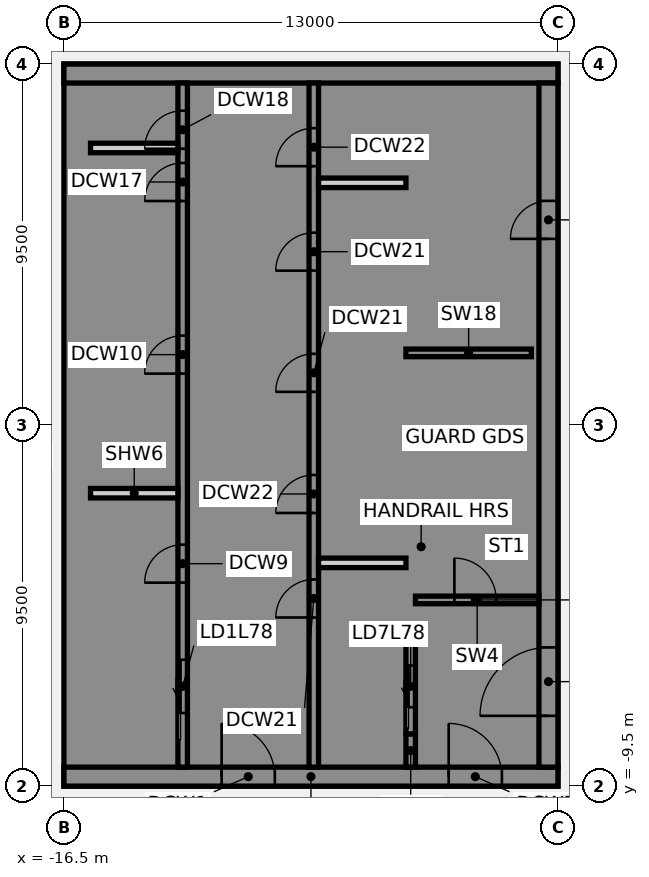
"""IFC4 building model, lengths in metres.
Left out: names, types, materials, properties, quantities, classifications, styles, units other than length and angle.
Written with IfcOpenShell. Run it as: python <this file> out.ifc"""

import sys

from ifc_helpers import new_model, si_unit, direction, frame, frame_2d, origin, place, context, subcontext, project, spatial, polyline, rectangle, outline, extrude, element, fill, save


model = new_model("IFC4")
c1 = context("Model", 3, precision=1e-05, world=origin(), true_north=direction((0.0, 1.0)))
c2 = subcontext(c1, "Body", "Model", "MODEL_VIEW")
j1 = project(units=[si_unit("LENGTHUNIT", "METRE"), si_unit("PLANEANGLEUNIT", "RADIAN")], contexts=[c1])
p1 = place(None, origin())
s1 = spatial("IfcSite", under=j1, at=p1, CompositionType="ELEMENT")
p2 = place(p1, origin())
s2 = spatial("IfcBuilding", under=s1, at=p2, CompositionType="ELEMENT")
p3 = place(p2, frame((0.0, 0.0, 317.4)))
s3 = spatial("IfcBuildingStorey", under=s2, at=p3, CompositionType="ELEMENT", Elevation=317.4)
p4 = place(p3, frame((-16.5, -9.25, 0.0), z_axis=(0.0, 0.0, 1.0), x_axis=(1.0, 0.0, 0.0)))
e1 = element("IfcWall", 1, at=p4, inside=s3, PredefinedType="SHEAR", context=c2, shape_type="SweptSolid", body=[
    extrude(rectangle(XDim=13.0, YDim=0.5, at=frame_2d((6.5, 0.0))), origin(), (0.0, 0.0, 1.0), 3.82),
])
p5 = place(p4, frame((4.15, 0.0, 0.0)))
e2 = element("IfcOpeningElement", 2, at=p5, cuts=e1, PredefinedType="OPENING", context=c2, shape_type="SweptSolid", body=[
    extrude(rectangle(XDim=1.4, YDim=2.1, at=frame_2d((0.7, 1.05))), frame((0.0, 0.26, 0.0), z_axis=(0.0, -1.0, 0.0), x_axis=(1.0, 0.0, 0.0)), (0.0, 0.0, 1.0), 0.52),
])
p6 = place(p4, frame((10.125, 0.0, 0.0)))
e3 = element("IfcOpeningElement", 3, at=p6, cuts=e1, PredefinedType="OPENING", context=c2, shape_type="SweptSolid", body=[
    extrude(rectangle(XDim=1.4, YDim=2.1, at=frame_2d((0.7, 1.05))), frame((0.0, 0.26, 0.0), z_axis=(0.0, -1.0, 0.0), x_axis=(1.0, 0.0, 0.0)), (0.0, 0.0, 1.0), 0.52),
])
p7 = place(p3, origin())
e4 = element("IfcWall", 4, at=p7, inside=s3, PredefinedType="SHEAR", context=c2, shape_type="SweptSolid", body=[
    extrude(outline(polyline([(-13.5, -8.125), (-16.0, -8.125), (-16.0, -5.625), (-13.5, -5.625), (-13.5, -5.375), (-16.0, -5.375), (-16.0, 8.125), (-13.5, 8.125), (-13.5, 9.0), (-16.0, 9.0), (-16.5, 9.0), (-16.5, -9.0), (-16.0, -9.0), (-13.5, -9.0), (-13.5, -8.125)])), origin(), (0.0, 0.0, 1.0), 3.82),
])
p8 = place(p3, frame((-16.5, 9.25, 0.0), z_axis=(0.0, 0.0, 1.0), x_axis=(1.0, 0.0, 0.0)))
e5 = element("IfcWall", 5, at=p8, inside=s3, PredefinedType="SHEAR", context=c2, shape_type="SweptSolid", body=[
    extrude(rectangle(XDim=13.0, YDim=0.5, at=frame_2d((6.5, 0.0))), origin(), (0.0, 0.0, 1.0), 3.82),
])
p9 = place(p3, origin())
e6 = element("IfcWall", 6, at=p9, inside=s3, PredefinedType="SHEAR", context=c2, shape_type="SweptSolid", body=[
    extrude(outline(polyline([(-9.8, -5.625), (-7.5, -5.625), (-7.25, -5.625), (-7.25, 9.0), (-7.5, 9.0), (-9.8, 9.0), (-9.8, 8.125), (-7.5, 8.125), (-7.5, -5.375), (-9.8, -5.375), (-9.8, -5.625)])), origin(), (0.0, 0.0, 1.0), 3.82),
])
p10 = place(p3, origin())
e7 = element("IfcWall", 7, at=p10, inside=s3, PredefinedType="SHEAR", context=c2, shape_type="SweptSolid", body=[
    extrude(outline(polyline([(-7.5, -8.125), (-9.55, -8.125), (-9.55, -5.625), (-9.8, -5.625), (-9.8, -8.125), (-9.8, -9.0), (-7.5, -9.0), (-7.5, -8.125)])), origin(), (0.0, 0.0, 1.0), 3.82),
])
p11 = place(p3, frame((-7.375, -9.0, 0.0), z_axis=(0.0, 0.0, 1.0), x_axis=(0.0, 1.0, 0.0)))
e8 = element("IfcWall", 8, at=p11, inside=s3, PredefinedType="SHEAR", context=c2, shape_type="SweptSolid", body=[
    extrude(rectangle(XDim=0.875, YDim=0.25, at=frame_2d((0.438, 0.0))), origin(), (0.0, 0.0, 1.0), 3.82),
])
p12 = place(p3, frame((-7.5, 1.9, 0.0), z_axis=(0.0, 0.0, 1.0), x_axis=(1.0, 0.0, 0.0)))
e9 = element("IfcWall", 9, at=p12, inside=s3, PredefinedType="SHEAR", context=c2, shape_type="SweptSolid", body=[
    extrude(rectangle(XDim=3.3, YDim=0.2, at=frame_2d((1.65, 0.0))), origin(), (0.0, 0.0, 1.0), 3.82),
])
p13 = place(p3, frame((-13.375, -9.0, 0.0), z_axis=(0.0, 0.0, 1.0), x_axis=(0.0, 1.0, 0.0)))
e10 = element("IfcWall", 10, at=p13, inside=s3, PredefinedType="SHEAR", context=c2, shape_type="SweptSolid", body=[
    extrude(rectangle(XDim=18.0, YDim=0.25, at=frame_2d((9.0, 0.0))), origin(), (0.0, 0.0, 1.0), 3.82),
])
p14 = place(p13, frame((1.425, 0.0, 0.0)))
e11 = element("IfcOpeningElement", 11, at=p14, cuts=e10, PredefinedType="OPENING", context=c2, shape_type="SweptSolid", body=[
    extrude(rectangle(XDim=1.4, YDim=2.1, at=frame_2d((0.7, 1.05))), frame((0.0, 0.135, 0.0), z_axis=(0.0, -1.0, 0.0), x_axis=(1.0, 0.0, 0.0)), (0.0, 0.0, 1.0), 0.27),
])
p15 = place(p13, frame((4.854, 0.0, 0.0)))
e12 = element("IfcOpeningElement", 12, at=p15, cuts=e10, PredefinedType="OPENING", context=c2, shape_type="SweptSolid", body=[
    extrude(rectangle(XDim=1.0, YDim=2.1, at=frame_2d((0.5, 1.05))), frame((0.0, 0.135, 0.0), z_axis=(0.0, -1.0, 0.0), x_axis=(1.0, 0.0, 0.0)), (0.0, 0.0, 1.0), 0.27),
])
p16 = place(p13, frame((10.354, 0.0, 0.0)))
e13 = element("IfcOpeningElement", 13, at=p16, cuts=e10, PredefinedType="OPENING", context=c2, shape_type="SweptSolid", body=[
    extrude(rectangle(XDim=1.0, YDim=2.1, at=frame_2d((0.5, 1.05))), frame((0.0, 0.135, 0.0), z_axis=(0.0, -1.0, 0.0), x_axis=(1.0, 0.0, 0.0)), (0.0, 0.0, 1.0), 0.27),
])
p17 = place(p13, frame((14.896, 0.0, 0.0)))
e14 = element("IfcOpeningElement", 14, at=p17, cuts=e10, PredefinedType="OPENING", context=c2, shape_type="SweptSolid", body=[
    extrude(rectangle(XDim=1.0, YDim=2.1, at=frame_2d((0.5, 1.05))), frame((0.0, 0.135, 0.0), z_axis=(0.0, -1.0, 0.0), x_axis=(1.0, 0.0, 0.0)), (0.0, 0.0, 1.0), 0.27),
])
p18 = place(p13, frame((16.271, 0.0, 0.0)))
e15 = element("IfcOpeningElement", 15, at=p18, cuts=e10, PredefinedType="OPENING", context=c2, shape_type="SweptSolid", body=[
    extrude(rectangle(XDim=1.0, YDim=2.1, at=frame_2d((0.5, 1.05))), frame((0.0, 0.135, 0.0), z_axis=(0.0, -1.0, 0.0), x_axis=(1.0, 0.0, 0.0)), (0.0, 0.0, 1.0), 0.27),
])
p19 = place(p3, frame((-9.925, -9.0, 0.0), z_axis=(0.0, 0.0, 1.0), x_axis=(0.0, 1.0, 0.0)))
e16 = element("IfcWall", 16, at=p19, inside=s3, PredefinedType="SHEAR", context=c2, shape_type="SweptSolid", body=[
    extrude(rectangle(XDim=18.0, YDim=0.25, at=frame_2d((9.0, 0.0))), origin(), (0.0, 0.0, 1.0), 3.82),
])
p20 = place(p19, frame((3.938, 0.0, 0.0)))
e17 = element("IfcOpeningElement", 17, at=p20, cuts=e16, PredefinedType="OPENING", context=c2, shape_type="SweptSolid", body=[
    extrude(rectangle(XDim=1.0, YDim=2.1, at=frame_2d((0.5, 1.05))), frame((0.0, 0.135, 0.0), z_axis=(0.0, -1.0, 0.0), x_axis=(1.0, 0.0, 0.0)), (0.0, 0.0, 1.0), 0.27),
])
p21 = place(p19, frame((6.688, 0.0, 0.0)))
e18 = element("IfcOpeningElement", 18, at=p21, cuts=e16, PredefinedType="OPENING", context=c2, shape_type="SweptSolid", body=[
    extrude(rectangle(XDim=1.0, YDim=2.1, at=frame_2d((0.5, 1.05))), frame((0.0, 0.135, 0.0), z_axis=(0.0, -1.0, 0.0), x_axis=(1.0, 0.0, 0.0)), (0.0, 0.0, 1.0), 0.27),
])
p22 = place(p19, frame((9.875, 0.0, 0.0)))
e19 = element("IfcOpeningElement", 19, at=p22, cuts=e16, PredefinedType="OPENING", context=c2, shape_type="SweptSolid", body=[
    extrude(rectangle(XDim=1.0, YDim=2.1, at=frame_2d((0.5, 1.05))), frame((0.0, 0.135, 0.0), z_axis=(0.0, -1.0, 0.0), x_axis=(1.0, 0.0, 0.0)), (0.0, 0.0, 1.0), 0.27),
])
p23 = place(p19, frame((13.062, 0.0, 0.0)))
e20 = element("IfcOpeningElement", 20, at=p23, cuts=e16, PredefinedType="OPENING", context=c2, shape_type="SweptSolid", body=[
    extrude(rectangle(XDim=1.0, YDim=2.1, at=frame_2d((0.5, 1.05))), frame((0.0, 0.135, 0.0), z_axis=(0.0, -1.0, 0.0), x_axis=(1.0, 0.0, 0.0)), (0.0, 0.0, 1.0), 0.27),
])
p24 = place(p19, frame((15.812, 0.0, 0.0)))
e21 = element("IfcOpeningElement", 21, at=p24, cuts=e16, PredefinedType="OPENING", context=c2, shape_type="SweptSolid", body=[
    extrude(rectangle(XDim=1.0, YDim=2.1, at=frame_2d((0.5, 1.05))), frame((0.0, 0.135, 0.0), z_axis=(0.0, -1.0, 0.0), x_axis=(1.0, 0.0, 0.0)), (0.0, 0.0, 1.0), 0.27),
])
p25 = place(p3, frame((-7.375, -8.125, 0.0), z_axis=(0.0, 0.0, 1.0), x_axis=(0.0, 1.0, 0.0)))
e22 = element("IfcWall", 22, at=p25, inside=s3, PredefinedType="SHEAR", context=c2, shape_type="SweptSolid", body=[
    extrude(rectangle(XDim=2.5, YDim=0.25, at=frame_2d((1.25, 0.0))), origin(), (0.0, 0.0, 1.0), 3.82),
])
p26 = place(p25, frame((0.7, 0.0, 0.0)))
e23 = element("IfcOpeningElement", 23, at=p26, cuts=e22, PredefinedType="OPENING", context=c2, shape_type="SweptSolid", body=[
    extrude(rectangle(XDim=1.1, YDim=2.1, at=frame_2d((0.55, 1.05))), frame((0.0, 0.135, 0.0), z_axis=(0.0, -1.0, 0.0), x_axis=(1.0, 0.0, 0.0)), (0.0, 0.0, 1.0), 0.27),
])
p27 = place(p3, frame((-3.75, -9.0, 0.0), z_axis=(0.0, 0.0, 1.0), x_axis=(0.0, 1.0, 0.0)))
e24 = element("IfcWall", 24, at=p27, inside=s3, PredefinedType="SHEAR", context=c2, shape_type="SweptSolid", body=[
    extrude(rectangle(XDim=18.0, YDim=0.5, at=frame_2d((9.0, 0.0))), origin(), (0.0, 0.0, 1.0), 3.82),
])
p28 = place(p27, frame((1.35, 0.0, 0.0)))
e25 = element("IfcOpeningElement", 25, at=p28, cuts=e24, PredefinedType="OPENING", context=c2, shape_type="SweptSolid", body=[
    extrude(rectangle(XDim=1.8, YDim=2.1, at=frame_2d((0.9, 1.05))), frame((0.0, 0.26, 0.0), z_axis=(0.0, -1.0, 0.0), x_axis=(1.0, 0.0, 0.0)), (0.0, 0.0, 1.0), 0.52),
])
p29 = place(p27, frame((13.9, 0.0, 0.0)))
e26 = element("IfcOpeningElement", 26, at=p29, cuts=e24, PredefinedType="OPENING", context=c2, shape_type="SweptSolid", body=[
    extrude(rectangle(XDim=1.0, YDim=2.1, at=frame_2d((0.5, 1.05))), frame((0.0, 0.26, 0.0), z_axis=(0.0, -1.0, 0.0), x_axis=(1.0, 0.0, 0.0)), (0.0, 0.0, 1.0), 0.52),
])
p30 = place(p3, frame((-7.25, -4.6, 0.0), z_axis=(0.0, 0.0, 1.0), x_axis=(1.0, 0.0, 0.0)))
e27 = element("IfcWall", 27, at=p30, inside=s3, PredefinedType="SHEAR", context=c2, shape_type="SweptSolid", body=[
    extrude(rectangle(XDim=3.25, YDim=0.2, at=frame_2d((1.625, 0.0))), origin(), (0.0, 0.0, 1.0), 3.82),
])
p31 = place(p30, frame((1.025, 0.0, 0.0)))
e28 = element("IfcOpeningElement", 28, at=p31, cuts=e27, PredefinedType="OPENING", context=c2, shape_type="SweptSolid", body=[
    extrude(rectangle(XDim=1.1, YDim=2.1, at=frame_2d((0.55, 1.05))), frame((0.0, 0.11, 0.0), z_axis=(0.0, -1.0, 0.0), x_axis=(1.0, 0.0, 0.0)), (0.0, 0.0, 1.0), 0.22),
])
for number, where, z_axis, x_axis in (
    (29, (-15.8, -1.792, 0.0), (0.0, 0.0, 1.0), (1.0, 0.0, 0.0)),
    (30, (-15.8, 7.292, 0.0), (0.0, 0.0, 1.0), (1.0, 0.0, 0.0)),
    (31, (-9.8, -3.625, 0.0), (0.0, 0.0, 1.0), (1.0, 0.0, 0.0)),
    (32, (-9.8, 6.375, 0.0), (0.0, 0.0, 1.0), (1.0, 0.0, 0.0)),
):
    element("IfcWall", number, at=place(p3, frame(where, z_axis=z_axis, x_axis=x_axis)), inside=s3, PredefinedType="PARTITIONING", context=c2, shape_type="SweptSolid", body=[
        extrude(rectangle(XDim=2.3, YDim=0.25, at=frame_2d((1.15, 0.0))), origin(), (0.0, 0.0, 1.0), 3.82),
    ])
p32 = place(p5, origin())
e33 = element("IfcDoor", 33, at=p32, inside=s3, OperationType="SINGLE_SWING_LEFT", PredefinedType="DOOR", context=c2, shape_type="SweptSolid", body=[
    extrude(rectangle(XDim=1.4, YDim=2.1, at=frame_2d((0.7, 1.05))), frame((0.0, 0.025, 0.0), z_axis=(0.0, -1.0, 0.0), x_axis=(1.0, 0.0, 0.0)), (0.0, 0.0, 1.0), 0.05),
])
fill(e2, e33)
p33 = place(p6, origin())
e34 = element("IfcDoor", 34, at=p33, inside=s3, OperationType="SINGLE_SWING_LEFT", PredefinedType="DOOR", context=c2, shape_type="SweptSolid", body=[
    extrude(rectangle(XDim=1.4, YDim=2.1, at=frame_2d((0.7, 1.05))), frame((0.0, 0.025, 0.0), z_axis=(0.0, -1.0, 0.0), x_axis=(1.0, 0.0, 0.0)), (0.0, 0.0, 1.0), 0.05),
])
fill(e3, e34)
p34 = place(p28, origin())
e35 = element("IfcDoor", 35, at=p34, inside=s3, OperationType="SINGLE_SWING_LEFT", PredefinedType="DOOR", context=c2, shape_type="SweptSolid", body=[
    extrude(rectangle(XDim=1.8, YDim=2.1, at=frame_2d((0.9, 1.05))), frame((0.0, 0.025, 0.0), z_axis=(0.0, -1.0, 0.0), x_axis=(1.0, 0.0, 0.0)), (0.0, 0.0, 1.0), 0.05),
])
fill(e25, e35)
p35 = place(p29, origin())
e36 = element("IfcDoor", 36, at=p35, inside=s3, OperationType="SINGLE_SWING_LEFT", PredefinedType="DOOR", context=c2, shape_type="SweptSolid", body=[
    extrude(rectangle(XDim=1.0, YDim=2.1, at=frame_2d((0.5, 1.05))), frame((0.0, 0.025, 0.0), z_axis=(0.0, -1.0, 0.0), x_axis=(1.0, 0.0, 0.0)), (0.0, 0.0, 1.0), 0.05),
])
fill(e26, e36)
p36 = place(p31, origin())
e37 = element("IfcDoor", 37, at=p36, inside=s3, OperationType="SINGLE_SWING_LEFT", PredefinedType="DOOR", context=c2, shape_type="SweptSolid", body=[
    extrude(rectangle(XDim=1.1, YDim=2.1, at=frame_2d((0.55, 1.05))), frame((0.0, 0.025, 0.0), z_axis=(0.0, -1.0, 0.0), x_axis=(1.0, 0.0, 0.0)), (0.0, 0.0, 1.0), 0.05),
])
fill(e28, e37)
p37 = place(p14, origin())
e38 = element("IfcDoor", 38, at=p37, inside=s3, OperationType="SLIDING_TO_LEFT", PredefinedType="DOOR", context=c2, shape_type="SweptSolid", body=[
    extrude(rectangle(XDim=1.4, YDim=2.1, at=frame_2d((0.7, 1.05))), frame((0.0, 0.025, 0.0), z_axis=(0.0, -1.0, 0.0), x_axis=(1.0, 0.0, 0.0)), (0.0, 0.0, 1.0), 0.05),
])
fill(e11, e38)
p38 = place(p26, origin())
e39 = element("IfcDoor", 39, at=p38, inside=s3, OperationType="SLIDING_TO_LEFT", PredefinedType="DOOR", context=c2, shape_type="SweptSolid", body=[
    extrude(rectangle(XDim=1.1, YDim=2.1, at=frame_2d((0.55, 1.05))), frame((0.0, 0.025, 0.0), z_axis=(0.0, -1.0, 0.0), x_axis=(1.0, 0.0, 0.0)), (0.0, 0.0, 1.0), 0.05),
])
fill(e23, e39)
p39 = place(p15, origin())
e40 = element("IfcDoor", 40, at=p39, inside=s3, OperationType="SINGLE_SWING_LEFT", PredefinedType="DOOR", context=c2, shape_type="SweptSolid", body=[
    extrude(rectangle(XDim=1.0, YDim=2.1, at=frame_2d((0.5, 1.05))), frame((0.0, 0.025, 0.0), z_axis=(0.0, -1.0, 0.0), x_axis=(1.0, 0.0, 0.0)), (0.0, 0.0, 1.0), 0.05),
])
fill(e12, e40)
p40 = place(p16, origin())
e41 = element("IfcDoor", 41, at=p40, inside=s3, OperationType="SINGLE_SWING_LEFT", PredefinedType="DOOR", context=c2, shape_type="SweptSolid", body=[
    extrude(rectangle(XDim=1.0, YDim=2.1, at=frame_2d((0.5, 1.05))), frame((0.0, 0.025, 0.0), z_axis=(0.0, -1.0, 0.0), x_axis=(1.0, 0.0, 0.0)), (0.0, 0.0, 1.0), 0.05),
])
fill(e13, e41)
p41 = place(p17, origin())
e42 = element("IfcDoor", 42, at=p41, inside=s3, OperationType="SINGLE_SWING_LEFT", PredefinedType="DOOR", context=c2, shape_type="SweptSolid", body=[
    extrude(rectangle(XDim=1.0, YDim=2.1, at=frame_2d((0.5, 1.05))), frame((0.0, 0.025, 0.0), z_axis=(0.0, -1.0, 0.0), x_axis=(1.0, 0.0, 0.0)), (0.0, 0.0, 1.0), 0.05),
])
fill(e14, e42)
p42 = place(p18, origin())
e43 = element("IfcDoor", 43, at=p42, inside=s3, OperationType="SINGLE_SWING_LEFT", PredefinedType="DOOR", context=c2, shape_type="SweptSolid", body=[
    extrude(rectangle(XDim=1.0, YDim=2.1, at=frame_2d((0.5, 1.05))), frame((0.0, 0.025, 0.0), z_axis=(0.0, -1.0, 0.0), x_axis=(1.0, 0.0, 0.0)), (0.0, 0.0, 1.0), 0.05),
])
fill(e15, e43)
p43 = place(p20, origin())
e44 = element("IfcDoor", 44, at=p43, inside=s3, OperationType="SINGLE_SWING_LEFT", PredefinedType="DOOR", context=c2, shape_type="SweptSolid", body=[
    extrude(rectangle(XDim=1.0, YDim=2.1, at=frame_2d((0.5, 1.05))), frame((0.0, 0.025, 0.0), z_axis=(0.0, -1.0, 0.0), x_axis=(1.0, 0.0, 0.0)), (0.0, 0.0, 1.0), 0.05),
])
fill(e17, e44)
p44 = place(p21, origin())
e45 = element("IfcDoor", 45, at=p44, inside=s3, OperationType="SINGLE_SWING_LEFT", PredefinedType="DOOR", context=c2, shape_type="SweptSolid", body=[
    extrude(rectangle(XDim=1.0, YDim=2.1, at=frame_2d((0.5, 1.05))), frame((0.0, 0.025, 0.0), z_axis=(0.0, -1.0, 0.0), x_axis=(1.0, 0.0, 0.0)), (0.0, 0.0, 1.0), 0.05),
])
fill(e18, e45)
p45 = place(p22, origin())
e46 = element("IfcDoor", 46, at=p45, inside=s3, OperationType="SINGLE_SWING_LEFT", PredefinedType="DOOR", context=c2, shape_type="SweptSolid", body=[
    extrude(rectangle(XDim=1.0, YDim=2.1, at=frame_2d((0.5, 1.05))), frame((0.0, 0.025, 0.0), z_axis=(0.0, -1.0, 0.0), x_axis=(1.0, 0.0, 0.0)), (0.0, 0.0, 1.0), 0.05),
])
fill(e19, e46)
p46 = place(p23, origin())
e47 = element("IfcDoor", 47, at=p46, inside=s3, OperationType="SINGLE_SWING_LEFT", PredefinedType="DOOR", context=c2, shape_type="SweptSolid", body=[
    extrude(rectangle(XDim=1.0, YDim=2.1, at=frame_2d((0.5, 1.05))), frame((0.0, 0.025, 0.0), z_axis=(0.0, -1.0, 0.0), x_axis=(1.0, 0.0, 0.0)), (0.0, 0.0, 1.0), 0.05),
])
fill(e20, e47)
p47 = place(p24, origin())
e48 = element("IfcDoor", 48, at=p47, inside=s3, OperationType="SINGLE_SWING_LEFT", PredefinedType="DOOR", context=c2, shape_type="SweptSolid", body=[
    extrude(rectangle(XDim=1.0, YDim=2.1, at=frame_2d((0.5, 1.05))), frame((0.0, 0.025, 0.0), z_axis=(0.0, -1.0, 0.0), x_axis=(1.0, 0.0, 0.0)), (0.0, 0.0, 1.0), 0.05),
])
fill(e21, e48)
save(model, sys.argv[1])
